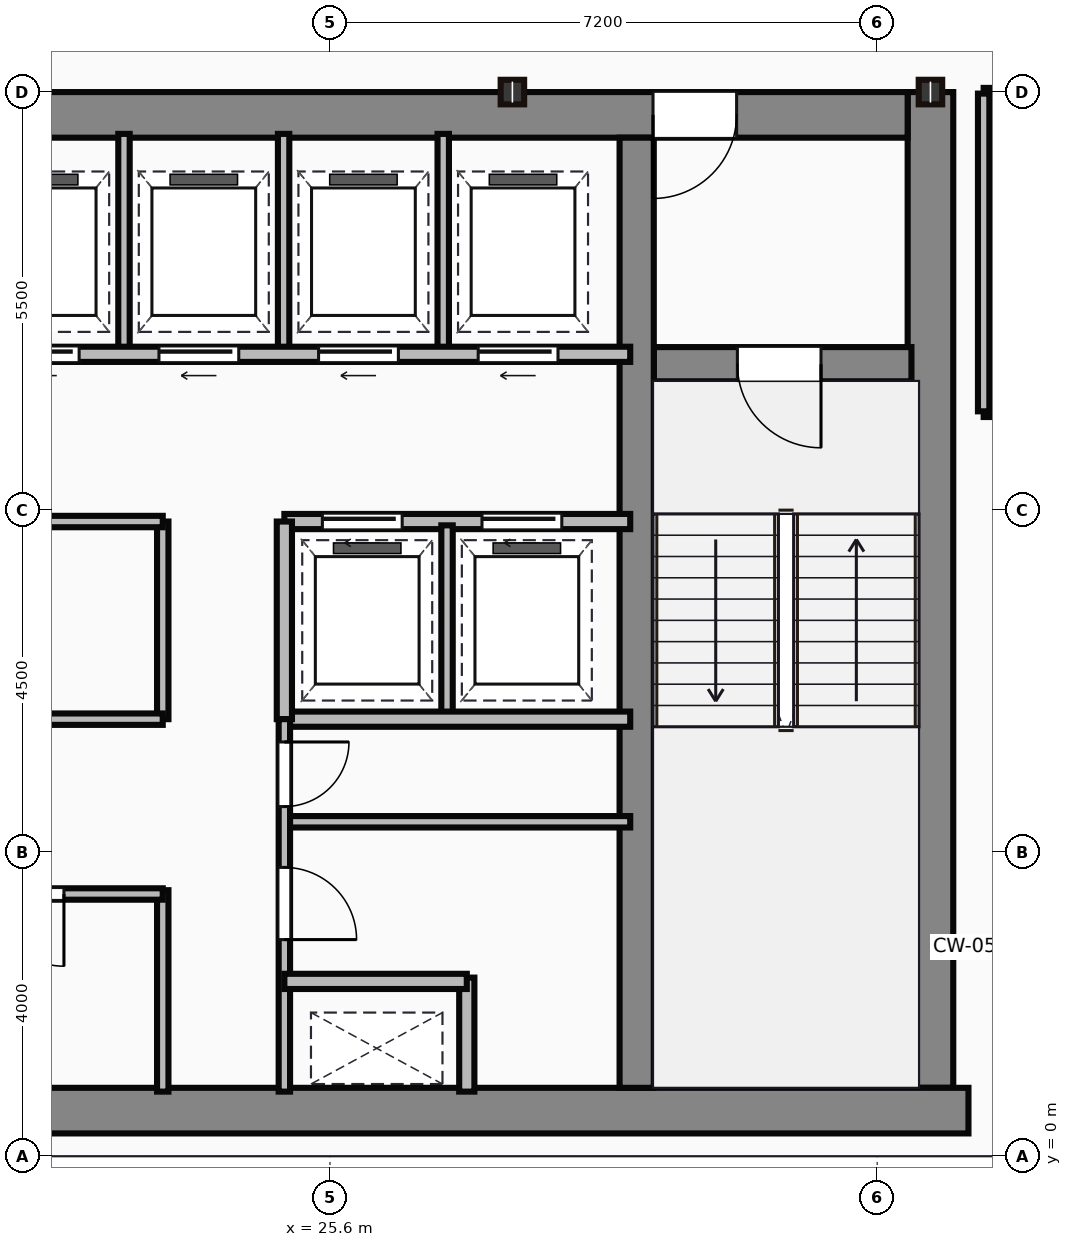
"""IFC4 building model, lengths in metres.
Left out: names, types, materials, properties, quantities, classifications, styles, units other than length and angle.
Written with IfcOpenShell. Run it as: python <this file> out.ifc"""

import sys

from ifc_helpers import new_model, si_unit, direction, frame, frame_2d, origin, origin_2d, place, context, subcontext, project, spatial, rectangle, i_section, extrude, source, transform, mapped, element, fill, save


model = new_model("IFC4")
c1 = context("Model", 3, precision=1e-05, world=origin(), true_north=direction((0.0, 1.0)))
c2 = subcontext(c1, "Body", "Model", "MODEL_VIEW")
j1 = project(units=[si_unit("LENGTHUNIT", "METRE"), si_unit("PLANEANGLEUNIT", "RADIAN")], contexts=[c1])
p1 = place(None, origin())
s1 = spatial("IfcSite", under=j1, at=p1, CompositionType="ELEMENT")
p2 = place(p1, origin())
s2 = spatial("IfcBuilding", under=s1, at=p2, CompositionType="ELEMENT")
p3 = place(p2, frame((0.0, 0.0, 277.05)))
s3 = spatial("IfcBuildingStorey", under=s2, at=p3, CompositionType="ELEMENT", Elevation=277.05)
m1 = source(origin(), c2, "Body", "SweptSolid", [
    extrude(rectangle(XDim=29.5, YDim=0.6, at=frame_2d((14.75, 0.0))), origin(), (0.0, 0.0, 1.0), 3.65),
])
p4 = place(p3, frame((4.5, 0.6, 0.0), z_axis=(0.0, 0.0, 1.0), x_axis=(1.0, 0.0, 0.0)))
e1 = element("IfcWall", 1, at=p4, inside=s3, PredefinedType="SHEAR", context=c2, shape_type="MappedRepresentation", body=[
    mapped(m1, transform((0.0, 0.0, 0.0))),
])
m2 = source(origin(), c2, "Body", "SweptSolid", [
    extrude(rectangle(XDim=13.1, YDim=0.6, at=frame_2d((6.55, 0.0))), origin(), (0.0, 0.0, 1.0), 3.65),
])
p5 = place(p3, frame((33.5, 0.9, 0.0), z_axis=(0.0, 0.0, 1.0), x_axis=(0.0, 1.0, 0.0)))
e2 = element("IfcWall", 2, at=p5, inside=s3, PredefinedType="SHEAR", context=c2, shape_type="MappedRepresentation", body=[
    mapped(m2, transform((0.0, 0.0, 0.0))),
])
m3 = source(origin(), c2, "Body", "SweptSolid", [
    extrude(rectangle(XDim=12.6, YDim=0.6, at=frame_2d((6.3, 0.0))), origin(), (0.0, 0.0, 1.0), 3.65),
])
p6 = place(p3, frame((20.6, 13.7, 0.0), z_axis=(0.0, 0.0, 1.0), x_axis=(1.0, 0.0, 0.0)))
e3 = element("IfcWall", 3, at=p6, inside=s3, PredefinedType="SHEAR", context=c2, shape_type="MappedRepresentation", body=[
    mapped(m3, transform((0.0, 0.0, 0.0))),
])
p7 = place(p6, frame((9.25, 0.0, 0.0)))
e4 = element("IfcOpeningElement", 4, at=p7, cuts=e3, PredefinedType="OPENING", context=c2, shape_type="SweptSolid", body=[
    extrude(rectangle(XDim=1.1, YDim=2.15, at=frame_2d((0.55, 1.075))), frame((0.0, 0.31, 0.0), z_axis=(0.0, -1.0, 0.0), x_axis=(1.0, 0.0, 0.0)), (0.0, 0.0, 1.0), 0.62),
])
m4 = source(origin(), c2, "Body", "SweptSolid", [
    extrude(rectangle(XDim=12.5, YDim=0.45, at=frame_2d((6.25, 0.0))), origin(), (0.0, 0.0, 1.0), 3.65),
])
p8 = place(p3, frame((29.635, 0.9, 0.0), z_axis=(0.0, 0.0, 1.0), x_axis=(0.0, 1.0, 0.0)))
e5 = element("IfcWall", 5, at=p8, inside=s3, PredefinedType="SHEAR", context=c2, shape_type="MappedRepresentation", body=[
    mapped(m4, transform((0.0, 0.0, 0.0))),
])
m5 = source(origin(), c2, "Body", "SweptSolid", [
    extrude(rectangle(XDim=3.39, YDim=0.45, at=frame_2d((1.695, 0.0))), origin(), (0.0, 0.0, 1.0), 3.65),
])
p9 = place(p3, frame((29.86, 10.42, 0.0), z_axis=(0.0, 0.0, 1.0), x_axis=(1.0, 0.0, 0.0)))
e6 = element("IfcWall", 6, at=p9, inside=s3, PredefinedType="SHEAR", context=c2, shape_type="MappedRepresentation", body=[
    mapped(m5, transform((0.0, 0.0, 0.0))),
])
p10 = place(p9, frame((1.1, 0.0, 0.0)))
e7 = element("IfcOpeningElement", 7, at=p10, cuts=e6, PredefinedType="OPENING", context=c2, shape_type="SweptSolid", body=[
    extrude(rectangle(XDim=1.1, YDim=2.15, at=frame_2d((0.55, 1.075))), frame((0.0, 0.235, 0.0), z_axis=(0.0, -1.0, 0.0), x_axis=(1.0, 0.0, 0.0)), (0.0, 0.0, 1.0), 0.47),
])
m6 = source(origin(), c2, "Body", "SweptSolid", [
    extrude(i_section(OverallWidth=0.309, OverallDepth=0.323, WebThickness=0.014, FlangeThickness=0.023, at=origin_2d()), origin(), (0.0, 0.0, 1.0), 3.65),
])
for number, where, z_axis, x_axis in (
    (8, (28.0, 14.0, 0.0), (0.0, 0.0, 1.0), (1.0, 0.0, 0.0)),
    (9, (33.5, 14.0, 0.0), (0.0, 0.0, 1.0), (1.0, 0.0, 0.0)),
):
    element("IfcColumn", number, at=place(p3, frame(where, z_axis=z_axis, x_axis=x_axis)), inside=s3, PredefinedType="COLUMN", context=c2, shape_type="MappedRepresentation", body=[
        mapped(m6, transform((0.0, 0.0, 0.0))),
    ])
m7 = source(origin(), c2, "Body", "SweptSolid", [
    extrude(rectangle(XDim=10.35, YDim=0.15, at=frame_2d((5.175, 0.0))), origin(), (0.0, 0.0, 1.0), 3.4),
])
p11 = place(p3, frame((13.05, 3.45, 0.0), z_axis=(0.0, 0.0, 1.0), x_axis=(1.0, 0.0, 0.0)))
e10 = element("IfcWall", 10, at=p11, inside=s3, PredefinedType="PARTITIONING", context=c2, shape_type="MappedRepresentation", body=[
    mapped(m7, transform((0.0, 0.0, 0.0))),
])
p12 = place(p11, frame((3.8, 0.0, 0.0)))
e11 = element("IfcOpeningElement", 11, at=p12, cuts=e10, PredefinedType="OPENING", context=c2, shape_type="SweptSolid", body=[
    extrude(rectangle(XDim=0.95, YDim=2.15, at=frame_2d((0.475, 1.075))), frame((0.0, 0.085, 0.0), z_axis=(0.0, -1.0, 0.0), x_axis=(1.0, 0.0, 0.0)), (0.0, 0.0, 1.0), 0.17),
])
p13 = place(p11, frame((8.1, 0.0, 0.0)))
e12 = element("IfcOpeningElement", 12, at=p13, cuts=e10, PredefinedType="OPENING", context=c2, shape_type="SweptSolid", body=[
    extrude(rectangle(XDim=0.95, YDim=2.15, at=frame_2d((0.475, 1.075))), frame((0.0, 0.085, 0.0), z_axis=(0.0, -1.0, 0.0), x_axis=(1.0, 0.0, 0.0)), (0.0, 0.0, 1.0), 0.17),
])
m8 = source(origin(), c2, "Body", "SweptSolid", [
    extrude(rectangle(XDim=2.65, YDim=0.15, at=frame_2d((1.325, 0.0))), origin(), (0.0, 0.0, 1.0), 3.4),
])
p14 = place(p3, frame((23.4, 0.85, 0.0), z_axis=(0.0, 0.0, 1.0), x_axis=(0.0, 1.0, 0.0)))
e13 = element("IfcWall", 13, at=p14, inside=s3, PredefinedType="PARTITIONING", context=c2, shape_type="MappedRepresentation", body=[
    mapped(m8, transform((0.0, 0.0, 0.0))),
])
m9 = source(origin(), c2, "Body", "SweptSolid", [
    extrude(rectangle(XDim=11.85, YDim=0.15, at=frame_2d((5.925, 0.0))), origin(), (0.0, 0.0, 1.0), 3.4),
])
p15 = place(p3, frame((11.55, 5.75, 0.0), z_axis=(0.0, 0.0, 1.0), x_axis=(1.0, 0.0, 0.0)))
e14 = element("IfcWall", 14, at=p15, inside=s3, PredefinedType="PARTITIONING", context=c2, shape_type="MappedRepresentation", body=[
    mapped(m9, transform((0.0, 0.0, 0.0))),
])
p16 = place(p3, frame((11.55, 8.35, 0.0), z_axis=(0.0, 0.0, 1.0), x_axis=(1.0, 0.0, 0.0)))
e15 = element("IfcWall", 15, at=p16, inside=s3, PredefinedType="PARTITIONING", context=c2, shape_type="MappedRepresentation", body=[
    mapped(m9, transform((0.0, 0.0, 0.0))),
])
p17 = place(p16, frame((1.1, 0.0, 0.0)))
e16 = element("IfcOpeningElement", 16, at=p17, cuts=e15, PredefinedType="OPENING", context=c2, shape_type="SweptSolid", body=[
    extrude(rectangle(XDim=0.95, YDim=2.15, at=frame_2d((0.475, 1.075))), frame((0.0, 0.085, 0.0), z_axis=(0.0, -1.0, 0.0), x_axis=(1.0, 0.0, 0.0)), (0.0, 0.0, 1.0), 0.17),
])
p18 = place(p16, frame((9.4, 0.0, 0.0)))
e17 = element("IfcOpeningElement", 17, at=p18, cuts=e15, PredefinedType="OPENING", context=c2, shape_type="SweptSolid", body=[
    extrude(rectangle(XDim=0.95, YDim=2.15, at=frame_2d((0.475, 1.075))), frame((0.0, 0.085, 0.0), z_axis=(0.0, -1.0, 0.0), x_axis=(1.0, 0.0, 0.0)), (0.0, 0.0, 1.0), 0.17),
])
m10 = source(origin(), c2, "Body", "SweptSolid", [
    extrude(rectangle(XDim=2.6, YDim=0.15, at=frame_2d((1.3, 0.0))), origin(), (0.0, 0.0, 1.0), 3.4),
])
p19 = place(p3, frame((23.4, 5.75, 0.0), z_axis=(0.0, 0.0, 1.0), x_axis=(0.0, 1.0, 0.0)))
e18 = element("IfcWall", 18, at=p19, inside=s3, PredefinedType="PARTITIONING", context=c2, shape_type="MappedRepresentation", body=[
    mapped(m10, transform((0.0, 0.0, 0.0))),
])
m11 = source(origin(), c2, "Body", "SweptSolid", [
    extrude(rectangle(XDim=8.8, YDim=0.2, at=frame_2d((4.4, 0.0))), origin(), (0.0, 0.0, 1.0), 3.4),
])
p20 = place(p3, frame((20.75, 10.55, 0.0), z_axis=(0.0, 0.0, 1.0), x_axis=(1.0, 0.0, 0.0)))
e19 = element("IfcWall", 19, at=p20, inside=s3, PredefinedType="PARTITIONING", context=c2, shape_type="MappedRepresentation", body=[
    mapped(m11, transform((0.0, 0.0, 0.0))),
])
p21 = place(p20, frame((0.5, 0.0, 0.0)))
e20 = element("IfcOpeningElement", 20, at=p21, cuts=e19, PredefinedType="OPENING", context=c2, shape_type="SweptSolid", body=[
    extrude(rectangle(XDim=1.05, YDim=2.15, at=frame_2d((0.525, 1.075))), frame((0.0, 0.11, 0.0), z_axis=(0.0, -1.0, 0.0), x_axis=(1.0, 0.0, 0.0)), (0.0, 0.0, 1.0), 0.22),
])
p22 = place(p20, frame((2.6, 0.0, 0.0)))
e21 = element("IfcOpeningElement", 21, at=p22, cuts=e19, PredefinedType="OPENING", context=c2, shape_type="SweptSolid", body=[
    extrude(rectangle(XDim=1.05, YDim=2.15, at=frame_2d((0.525, 1.075))), frame((0.0, 0.11, 0.0), z_axis=(0.0, -1.0, 0.0), x_axis=(1.0, 0.0, 0.0)), (0.0, 0.0, 1.0), 0.22),
])
p23 = place(p20, frame((4.7, 0.0, 0.0)))
e22 = element("IfcOpeningElement", 22, at=p23, cuts=e19, PredefinedType="OPENING", context=c2, shape_type="SweptSolid", body=[
    extrude(rectangle(XDim=1.05, YDim=2.15, at=frame_2d((0.525, 1.075))), frame((0.0, 0.11, 0.0), z_axis=(0.0, -1.0, 0.0), x_axis=(1.0, 0.0, 0.0)), (0.0, 0.0, 1.0), 0.22),
])
p24 = place(p20, frame((6.8, 0.0, 0.0)))
e23 = element("IfcOpeningElement", 23, at=p24, cuts=e19, PredefinedType="OPENING", context=c2, shape_type="SweptSolid", body=[
    extrude(rectangle(XDim=1.05, YDim=2.15, at=frame_2d((0.525, 1.075))), frame((0.0, 0.11, 0.0), z_axis=(0.0, -1.0, 0.0), x_axis=(1.0, 0.0, 0.0)), (0.0, 0.0, 1.0), 0.22),
])
m12 = source(origin(), c2, "Body", "SweptSolid", [
    extrude(rectangle(XDim=2.85, YDim=0.15, at=frame_2d((1.425, 0.0))), origin(), (0.0, 0.0, 1.0), 3.4),
])
for number, where, z_axis, x_axis in (
    (24, (22.89, 10.6, 0.0), (0.0, 0.0, 1.0), (0.0, 1.0, 0.0)),
    (25, (24.99, 10.6, 0.0), (0.0, 0.0, 1.0), (0.0, 1.0, 0.0)),
    (26, (27.09, 10.6, 0.0), (0.0, 0.0, 1.0), (0.0, 1.0, 0.0)),
):
    element("IfcWall", number, at=place(p3, frame(where, z_axis=z_axis, x_axis=x_axis)), inside=s3, PredefinedType="PARTITIONING", context=c2, shape_type="MappedRepresentation", body=[
        mapped(m12, transform((0.0, 0.0, 0.0))),
    ])
m13 = source(origin(), c2, "Body", "SweptSolid", [
    extrude(rectangle(XDim=4.55, YDim=0.2, at=frame_2d((2.275, 0.0))), origin(), (0.0, 0.0, 1.0), 3.4),
])
p25 = place(p3, frame((25.0, 8.35, 0.0), z_axis=(0.0, 0.0, 1.0), x_axis=(1.0, 0.0, 0.0)))
e27 = element("IfcWall", 27, at=p25, inside=s3, PredefinedType="PARTITIONING", context=c2, shape_type="MappedRepresentation", body=[
    mapped(m13, transform((0.0, 0.0, 0.0))),
])
p26 = place(p25, frame((0.5, 0.0, 0.0)))
e28 = element("IfcOpeningElement", 28, at=p26, cuts=e27, PredefinedType="OPENING", context=c2, shape_type="SweptSolid", body=[
    extrude(rectangle(XDim=1.05, YDim=2.15, at=frame_2d((0.525, 1.075))), frame((0.0, 0.11, 0.0), z_axis=(0.0, -1.0, 0.0), x_axis=(1.0, 0.0, 0.0)), (0.0, 0.0, 1.0), 0.22),
])
p27 = place(p25, frame((2.6, 0.0, 0.0)))
e29 = element("IfcOpeningElement", 29, at=p27, cuts=e27, PredefinedType="OPENING", context=c2, shape_type="SweptSolid", body=[
    extrude(rectangle(XDim=1.05, YDim=2.15, at=frame_2d((0.525, 1.075))), frame((0.0, 0.11, 0.0), z_axis=(0.0, -1.0, 0.0), x_axis=(1.0, 0.0, 0.0)), (0.0, 0.0, 1.0), 0.22),
])
p28 = place(p3, frame((25.0, 5.75, 0.0), z_axis=(0.0, 0.0, 1.0), x_axis=(1.0, 0.0, 0.0)))
e30 = element("IfcWall", 30, at=p28, inside=s3, PredefinedType="PARTITIONING", context=c2, shape_type="MappedRepresentation", body=[
    mapped(m13, transform((0.0, 0.0, 0.0))),
])
m14 = source(origin(), c2, "Body", "SweptSolid", [
    extrude(rectangle(XDim=2.6, YDim=0.2, at=frame_2d((1.3, 0.0))), origin(), (0.0, 0.0, 1.0), 3.4),
])
p29 = place(p3, frame((25.0, 5.75, 0.0), z_axis=(0.0, 0.0, 1.0), x_axis=(0.0, 1.0, 0.0)))
e31 = element("IfcWall", 31, at=p29, inside=s3, PredefinedType="PARTITIONING", context=c2, shape_type="MappedRepresentation", body=[
    mapped(m14, transform((0.0, 0.0, 0.0))),
])
m15 = source(origin(), c2, "Body", "SweptSolid", [
    extrude(rectangle(XDim=2.5, YDim=0.15, at=frame_2d((1.25, 0.0))), origin(), (0.0, 0.0, 1.0), 3.4),
])
p30 = place(p3, frame((27.14, 5.8, 0.0), z_axis=(0.0, 0.0, 1.0), x_axis=(0.0, 1.0, 0.0)))
e32 = element("IfcWall", 32, at=p30, inside=s3, PredefinedType="PARTITIONING", context=c2, shape_type="MappedRepresentation", body=[
    mapped(m15, transform((0.0, 0.0, 0.0))),
])
m16 = source(origin(), c2, "Body", "SweptSolid", [
    extrude(rectangle(XDim=4.9, YDim=0.15, at=frame_2d((2.45, 0.0))), origin(), (0.0, 0.0, 1.0), 3.4),
])
p31 = place(p3, frame((25.0, 0.85, 0.0), z_axis=(0.0, 0.0, 1.0), x_axis=(0.0, 1.0, 0.0)))
e33 = element("IfcWall", 33, at=p31, inside=s3, PredefinedType="PARTITIONING", context=c2, shape_type="MappedRepresentation", body=[
    mapped(m16, transform((0.0, 0.0, 0.0))),
])
p32 = place(p31, frame((2.0, 0.0, 0.0)))
e34 = element("IfcOpeningElement", 34, at=p32, cuts=e33, PredefinedType="OPENING", context=c2, shape_type="SweptSolid", body=[
    extrude(rectangle(XDim=0.95, YDim=2.15, at=frame_2d((0.475, 1.075))), frame((0.0, 0.085, 0.0), z_axis=(0.0, -1.0, 0.0), x_axis=(1.0, 0.0, 0.0)), (0.0, 0.0, 1.0), 0.17),
])
p33 = place(p31, frame((3.75, 0.0, 0.0)))
e35 = element("IfcOpeningElement", 35, at=p33, cuts=e33, PredefinedType="OPENING", context=c2, shape_type="SweptSolid", body=[
    extrude(rectangle(XDim=0.85, YDim=2.15, at=frame_2d((0.425, 1.075))), frame((0.0, 0.085, 0.0), z_axis=(0.0, -1.0, 0.0), x_axis=(1.0, 0.0, 0.0)), (0.0, 0.0, 1.0), 0.17),
])
m17 = source(origin(), c2, "Body", "SweptSolid", [
    extrude(rectangle(XDim=2.4, YDim=0.2, at=frame_2d((1.2, 0.0))), origin(), (0.0, 0.0, 1.0), 3.4),
])
p34 = place(p3, frame((25.0, 2.3, 0.0), z_axis=(0.0, 0.0, 1.0), x_axis=(1.0, 0.0, 0.0)))
e36 = element("IfcWall", 36, at=p34, inside=s3, PredefinedType="PARTITIONING", context=c2, shape_type="MappedRepresentation", body=[
    mapped(m17, transform((0.0, 0.0, 0.0))),
])
m18 = source(origin(), c2, "Body", "SweptSolid", [
    extrude(rectangle(XDim=1.5, YDim=0.2, at=frame_2d((0.75, 0.0))), origin(), (0.0, 0.0, 1.0), 3.4),
])
p35 = place(p3, frame((27.4, 0.85, 0.0), z_axis=(0.0, 0.0, 1.0), x_axis=(0.0, 1.0, 0.0)))
e37 = element("IfcWall", 37, at=p35, inside=s3, PredefinedType="PARTITIONING", context=c2, shape_type="MappedRepresentation", body=[
    mapped(m18, transform((0.0, 0.0, 0.0))),
])
m19 = source(origin(), c2, "Body", "SweptSolid", [
    extrude(rectangle(XDim=4.55, YDim=0.15, at=frame_2d((2.275, 0.0))), origin(), (0.0, 0.0, 1.0), 3.4),
])
p36 = place(p3, frame((25.0, 4.4, 0.0), z_axis=(0.0, 0.0, 1.0), x_axis=(1.0, 0.0, 0.0)))
e38 = element("IfcWall", 38, at=p36, inside=s3, PredefinedType="PARTITIONING", context=c2, shape_type="MappedRepresentation", body=[
    mapped(m19, transform((0.0, 0.0, 0.0))),
])
m20 = source(origin(), c2, "Body", "SweptSolid", [
    extrude(rectangle(XDim=4.8, YDim=0.15, at=frame_2d((2.4, 0.0))), origin(), (0.0, 0.0, 1.0), 2.787),
])
p37 = place(p3, frame((34.2, 13.98, 0.0), z_axis=(0.0, 0.0, 1.0), x_axis=(1.0, 0.0, 0.0)))
e39 = element("IfcWall", 39, at=p37, inside=s3, PredefinedType="PARTITIONING", context=c2, shape_type="MappedRepresentation", body=[
    mapped(m20, transform((0.0, 0.0, 0.0))),
])
p38 = place(p37, frame((0.35, 0.0, 0.0)))
e40 = element("IfcOpeningElement", 40, at=p38, cuts=e39, PredefinedType="OPENING", context=c2, shape_type="SweptSolid", body=[
    extrude(rectangle(XDim=0.85, YDim=2.1, at=frame_2d((0.425, 1.05))), frame((0.0, 0.085, 0.0), z_axis=(0.0, -1.0, 0.0), x_axis=(1.0, 0.0, 0.0)), (0.0, 0.0, 1.0), 0.17),
])
p39 = place(p37, frame((1.95, 0.0, 0.0)))
e41 = element("IfcOpeningElement", 41, at=p39, cuts=e39, PredefinedType="OPENING", context=c2, shape_type="SweptSolid", body=[
    extrude(rectangle(XDim=0.85, YDim=2.1, at=frame_2d((0.425, 1.05))), frame((0.0, 0.085, 0.0), z_axis=(0.0, -1.0, 0.0), x_axis=(1.0, 0.0, 0.0)), (0.0, 0.0, 1.0), 0.17),
])
p40 = place(p37, frame((3.5, 0.0, 0.0)))
e42 = element("IfcOpeningElement", 42, at=p40, cuts=e39, PredefinedType="OPENING", context=c2, shape_type="SweptSolid", body=[
    extrude(rectangle(XDim=0.9, YDim=2.1, at=frame_2d((0.45, 1.05))), frame((0.0, 0.085, 0.0), z_axis=(0.0, -1.0, 0.0), x_axis=(1.0, 0.0, 0.0)), (0.0, 0.0, 1.0), 0.17),
])
m21 = source(origin(), c2, "Body", "SweptSolid", [
    extrude(rectangle(XDim=4.8, YDim=0.15, at=frame_2d((2.4, 0.0))), origin(), (0.0, 0.0, 1.0), 3.4),
])
p41 = place(p3, frame((34.2, 9.8, 0.0), z_axis=(0.0, 0.0, 1.0), x_axis=(1.0, 0.0, 0.0)))
e43 = element("IfcWall", 43, at=p41, inside=s3, PredefinedType="PARTITIONING", context=c2, shape_type="MappedRepresentation", body=[
    mapped(m21, transform((0.0, 0.0, 0.0))),
])
m22 = source(origin(), c2, "Body", "SweptSolid", [
    extrude(rectangle(XDim=4.18, YDim=0.15, at=frame_2d((2.09, 0.0))), origin(), (0.0, 0.0, 1.0), 3.4),
])
p42 = place(p3, frame((34.2, 9.8, 0.0), z_axis=(0.0, 0.0, 1.0), x_axis=(0.0, 1.0, 0.0)))
e44 = element("IfcWall", 44, at=p42, inside=s3, PredefinedType="PARTITIONING", context=c2, shape_type="MappedRepresentation", body=[
    mapped(m22, transform((0.0, 0.0, 0.0))),
])
m23 = source(origin(), c2, "Body", "SweptSolid", [
    extrude(rectangle(XDim=1.1, YDim=2.15, at=frame_2d((0.55, 1.075))), frame((0.0, 0.025, 0.0), z_axis=(0.0, -1.0, 0.0), x_axis=(1.0, 0.0, 0.0)), (0.0, 0.0, 1.0), 0.05),
])
p43 = place(p10, frame((1.1, 0.0, 0.0), z_axis=(0.0, 0.0, 1.0), x_axis=(-1.0, 0.0, 0.0)))
e45 = element("IfcDoor", 45, at=p43, inside=s3, OperationType="SINGLE_SWING_RIGHT", PredefinedType="DOOR", context=c2, shape_type="MappedRepresentation", body=[
    mapped(m23, transform((0.0, 0.0, 0.0))),
])
fill(e7, e45)
p44 = place(p7, origin())
e46 = element("IfcDoor", 46, at=p44, inside=s3, OperationType="SINGLE_SWING_LEFT", PredefinedType="DOOR", context=c2, shape_type="MappedRepresentation", body=[
    mapped(m23, transform((0.0, 0.0, 0.0))),
])
fill(e4, e46)
m24 = source(origin(), c2, "Body", "SweptSolid", [
    extrude(rectangle(XDim=0.95, YDim=2.15, at=frame_2d((0.475, 1.075))), frame((0.0, 0.025, 0.0), z_axis=(0.0, -1.0, 0.0), x_axis=(1.0, 0.0, 0.0)), (0.0, 0.0, 1.0), 0.05),
])
p45 = place(p13, origin())
e47 = element("IfcDoor", 47, at=p45, inside=s3, OperationType="SINGLE_SWING_RIGHT", PredefinedType="DOOR", context=c2, shape_type="MappedRepresentation", body=[
    mapped(m24, transform((0.0, 0.0, 0.0))),
])
fill(e12, e47)
m25 = source(origin(), c2, "Body", "SweptSolid", [
    extrude(rectangle(XDim=1.05, YDim=2.15, at=frame_2d((0.525, 1.075))), frame((0.0, 0.025, 0.0), z_axis=(0.0, -1.0, 0.0), x_axis=(1.0, 0.0, 0.0)), (0.0, 0.0, 1.0), 0.05),
])
p46 = place(p21, frame((1.05, 0.0, 0.0), z_axis=(0.0, 0.0, 1.0), x_axis=(-1.0, 0.0, 0.0)))
e48 = element("IfcDoor", 48, at=p46, inside=s3, OperationType="SLIDING_TO_LEFT", PredefinedType="DOOR", context=c2, shape_type="MappedRepresentation", body=[
    mapped(m25, transform((0.0, 0.0, 0.0))),
])
fill(e20, e48)
p47 = place(p22, frame((1.05, 0.0, 0.0), z_axis=(0.0, 0.0, 1.0), x_axis=(-1.0, 0.0, 0.0)))
e49 = element("IfcDoor", 49, at=p47, inside=s3, OperationType="SLIDING_TO_LEFT", PredefinedType="DOOR", context=c2, shape_type="MappedRepresentation", body=[
    mapped(m25, transform((0.0, 0.0, 0.0))),
])
fill(e21, e49)
p48 = place(p23, frame((1.05, 0.0, 0.0), z_axis=(0.0, 0.0, 1.0), x_axis=(-1.0, 0.0, 0.0)))
e50 = element("IfcDoor", 50, at=p48, inside=s3, OperationType="SLIDING_TO_LEFT", PredefinedType="DOOR", context=c2, shape_type="MappedRepresentation", body=[
    mapped(m25, transform((0.0, 0.0, 0.0))),
])
fill(e22, e50)
p49 = place(p24, frame((1.05, 0.0, 0.0), z_axis=(0.0, 0.0, 1.0), x_axis=(-1.0, 0.0, 0.0)))
e51 = element("IfcDoor", 51, at=p49, inside=s3, OperationType="SLIDING_TO_LEFT", PredefinedType="DOOR", context=c2, shape_type="MappedRepresentation", body=[
    mapped(m25, transform((0.0, 0.0, 0.0))),
])
fill(e23, e51)
p50 = place(p26, origin())
e52 = element("IfcDoor", 52, at=p50, inside=s3, OperationType="SLIDING_TO_LEFT", PredefinedType="DOOR", context=c2, shape_type="MappedRepresentation", body=[
    mapped(m25, transform((0.0, 0.0, 0.0))),
])
fill(e28, e52)
p51 = place(p27, origin())
e53 = element("IfcDoor", 53, at=p51, inside=s3, OperationType="SLIDING_TO_LEFT", PredefinedType="DOOR", context=c2, shape_type="MappedRepresentation", body=[
    mapped(m25, transform((0.0, 0.0, 0.0))),
])
fill(e29, e53)
p52 = place(p32, origin())
e54 = element("IfcDoor", 54, at=p52, inside=s3, OperationType="SINGLE_SWING_LEFT", PredefinedType="DOOR", context=c2, shape_type="MappedRepresentation", body=[
    mapped(m24, transform((0.0, 0.0, 0.0))),
])
fill(e34, e54)
m26 = source(origin(), c2, "Body", "SweptSolid", [
    extrude(rectangle(XDim=0.85, YDim=2.15, at=frame_2d((0.425, 1.075))), frame((0.0, 0.025, 0.0), z_axis=(0.0, -1.0, 0.0), x_axis=(1.0, 0.0, 0.0)), (0.0, 0.0, 1.0), 0.05),
])
p53 = place(p33, origin())
e55 = element("IfcDoor", 55, at=p53, inside=s3, OperationType="SINGLE_SWING_RIGHT", PredefinedType="DOOR", context=c2, shape_type="MappedRepresentation", body=[
    mapped(m26, transform((0.0, 0.0, 0.0))),
])
fill(e35, e55)
save(model, sys.argv[1])
